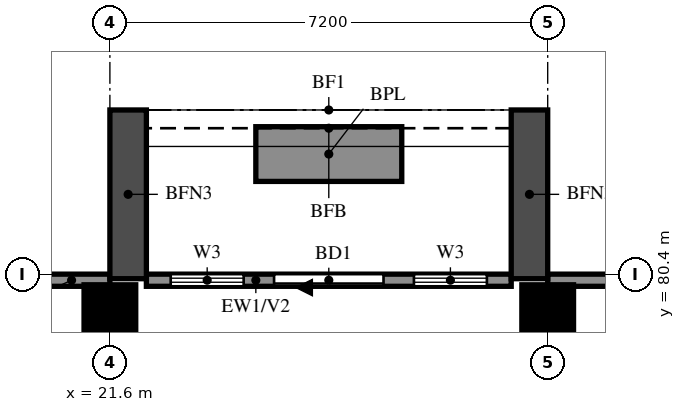
"""IFC4 building model, lengths in metres.
Left out: names, types, materials, properties, quantities, classifications, styles, units other than length and angle.
Written with IfcOpenShell. Run it as: python <this file> out.ifc"""

import sys

from ifc_helpers import new_model, si_unit, direction, frame, frame_2d, origin, origin_2d, place, context, subcontext, project, spatial, rectangle, extrude, source, transform, mapped, element, fill, save


model = new_model("IFC4")
c1 = context("Model", 3, precision=1e-05, world=origin(), true_north=direction((0.0, 1.0)))
c2 = subcontext(c1, "Body", "Model", "MODEL_VIEW")
j1 = project(units=[si_unit("LENGTHUNIT", "METRE"), si_unit("PLANEANGLEUNIT", "RADIAN")], contexts=[c1])
p1 = place(None, origin())
s1 = spatial("IfcSite", under=j1, at=p1, CompositionType="ELEMENT")
p2 = place(p1, origin())
s2 = spatial("IfcBuilding", under=s1, at=p2, CompositionType="ELEMENT")
p3 = place(p2, frame((0.0, 0.0, 150.0)))
s3 = spatial("IfcBuildingStorey", under=s2, at=p3, CompositionType="ELEMENT", Elevation=150.0)
m1 = source(origin(), c2, "Body", "SweptSolid", [
    extrude(rectangle(XDim=0.85, YDim=0.85, at=origin_2d()), origin(), (0.0, 0.0, 1.0), 3.2),
])
for number, where, z_axis, x_axis in (
    (1, (21.6, 79.8, 0.0), (0.0, 0.0, 1.0), (1.0, 0.0, 0.0)),
    (2, (28.8, 79.8, 0.0), (0.0, 0.0, 1.0), (1.0, 0.0, 0.0)),
):
    element("IfcColumn", number, at=place(p3, frame(where, z_axis=z_axis, x_axis=x_axis)), inside=s3, PredefinedType="COLUMN", context=c2, shape_type="MappedRepresentation", body=[
        mapped(m1, transform((0.0, 0.0, 0.0))),
    ])
p4 = place(p3, frame((82.6, 80.3, 0.0), z_axis=(0.0, 0.0, 1.0), x_axis=(-1.0, 0.0, 0.0)))
e3 = element("IfcWall", 3, at=p4, inside=s3, PredefinedType="SOLIDWALL", context=c2, shape_type="SweptSolid", body=[
    extrude(rectangle(XDim=53.8, YDim=0.2, at=frame_2d((26.9, 0.0))), origin(), (0.0, 0.0, 1.0), 3.2),
])
p5 = place(p4, frame((0.712, 0.0, 0.6)))
e4 = element("IfcOpeningElement", 4, at=p5, cuts=e3, PredefinedType="OPENING", context=c2, shape_type="SweptSolid", body=[
    extrude(rectangle(XDim=1.8, YDim=2.4, at=frame_2d((0.9, 1.2))), frame((0.0, 0.11, 0.0), z_axis=(0.0, -1.0, 0.0), x_axis=(1.0, 0.0, 0.0)), (0.0, 0.0, 1.0), 0.22),
])
p6 = place(p4, frame((4.358, 0.0, 0.6)))
e5 = element("IfcOpeningElement", 5, at=p6, cuts=e3, PredefinedType="OPENING", context=c2, shape_type="SweptSolid", body=[
    extrude(rectangle(XDim=2.4, YDim=2.4, at=frame_2d((1.2, 1.2))), frame((0.0, 0.11, 0.0), z_axis=(0.0, -1.0, 0.0), x_axis=(1.0, 0.0, 0.0)), (0.0, 0.0, 1.0), 0.22),
])
p7 = place(p4, frame((7.242, 0.0, 0.6)))
e6 = element("IfcOpeningElement", 6, at=p7, cuts=e3, PredefinedType="OPENING", context=c2, shape_type="SweptSolid", body=[
    extrude(rectangle(XDim=2.4, YDim=2.4, at=frame_2d((1.2, 1.2))), frame((0.0, 0.11, 0.0), z_axis=(0.0, -1.0, 0.0), x_axis=(1.0, 0.0, 0.0)), (0.0, 0.0, 1.0), 0.22),
])
p8 = place(p3, frame((28.2, 80.3, 0.0), z_axis=(0.0, 0.0, 1.0), x_axis=(-1.0, 0.0, 0.0)))
e7 = element("IfcWall", 7, at=p8, inside=s3, PredefinedType="SOLIDWALL", context=c2, shape_type="SweptSolid", body=[
    extrude(rectangle(XDim=6.0, YDim=0.2, at=frame_2d((3.0, 0.0))), origin(), (0.0, 0.0, 1.0), 3.2),
])
p9 = place(p8, frame((2.1, 0.0, 0.0)))
e8 = element("IfcOpeningElement", 8, at=p9, cuts=e7, PredefinedType="OPENING", context=c2, shape_type="SweptSolid", body=[
    extrude(rectangle(XDim=1.8, YDim=2.4, at=frame_2d((0.9, 1.2))), frame((0.0, 0.11, 0.0), z_axis=(0.0, -1.0, 0.0), x_axis=(1.0, 0.0, 0.0)), (0.0, 0.0, 1.0), 0.22),
])
p10 = place(p8, frame((0.4, 0.0, 0.6)))
e9 = element("IfcOpeningElement", 9, at=p10, cuts=e7, PredefinedType="OPENING", context=c2, shape_type="SweptSolid", body=[
    extrude(rectangle(XDim=1.2, YDim=2.4, at=frame_2d((0.6, 1.2))), frame((0.0, 0.11, 0.0), z_axis=(0.0, -1.0, 0.0), x_axis=(1.0, 0.0, 0.0)), (0.0, 0.0, 1.0), 0.22),
])
p11 = place(p8, frame((4.4, 0.0, 0.6)))
e10 = element("IfcOpeningElement", 10, at=p11, cuts=e7, PredefinedType="OPENING", context=c2, shape_type="SweptSolid", body=[
    extrude(rectangle(XDim=1.2, YDim=2.4, at=frame_2d((0.6, 1.2))), frame((0.0, 0.11, 0.0), z_axis=(0.0, -1.0, 0.0), x_axis=(1.0, 0.0, 0.0)), (0.0, 0.0, 1.0), 0.22),
])
p12 = place(p3, frame((21.6, 80.3, 0.0), z_axis=(0.0, 0.0, 1.0), x_axis=(-1.0, 0.0, 0.0)))
e11 = element("IfcWall", 11, at=p12, inside=s3, PredefinedType="SOLIDWALL", context=c2, shape_type="SweptSolid", body=[
    extrude(rectangle(XDim=3.6, YDim=0.2, at=frame_2d((1.8, 0.0))), origin(), (0.0, 0.0, 1.0), 3.2),
])
p13 = place(p12, frame((0.988, 0.0, 0.6)))
e12 = element("IfcOpeningElement", 12, at=p13, cuts=e11, PredefinedType="OPENING", context=c2, shape_type="SweptSolid", body=[
    extrude(rectangle(XDim=1.8, YDim=2.4, at=frame_2d((0.9, 1.2))), frame((0.0, 0.11, 0.0), z_axis=(0.0, -1.0, 0.0), x_axis=(1.0, 0.0, 0.0)), (0.0, 0.0, 1.0), 0.22),
])
for number, where, z_axis, x_axis in (
    (13, (28.5, 80.325, 0.0), (0.0, 0.0, 1.0), (0.0, 1.0, 0.0)),
    (14, (21.9, 80.325, 0.0), (0.0, 0.0, 1.0), (0.0, 1.0, 0.0)),
):
    element("IfcWall", number, at=place(p3, frame(where, z_axis=z_axis, x_axis=x_axis)), inside=s3, PredefinedType="SOLIDWALL", context=c2, shape_type="SweptSolid", body=[
        extrude(rectangle(XDim=2.775, YDim=0.6, at=frame_2d((1.388, 0.0))), origin(), (0.0, 0.0, 1.0), 2.85),
    ])
p14 = place(p3, frame((26.4, 82.375, 0.0), z_axis=(0.0, 0.0, 1.0), x_axis=(-1.0, 0.0, 0.0)))
e15 = element("IfcWall", 15, at=p14, inside=s3, PredefinedType="SOLIDWALL", context=c2, shape_type="SweptSolid", body=[
    extrude(rectangle(XDim=2.4, YDim=0.9, at=frame_2d((1.2, 0.0))), origin(), (0.0, 0.0, 1.0), 0.9),
])
p15 = place(p9, origin())
e16 = element("IfcDoor", 16, at=p15, inside=s3, OperationType="DOUBLE_DOOR_SLIDING", PredefinedType="DOOR", context=c2, shape_type="SweptSolid", body=[
    extrude(rectangle(XDim=1.8, YDim=2.4, at=frame_2d((0.9, 1.2))), frame((0.0, 0.025, 0.0), z_axis=(0.0, -1.0, 0.0), x_axis=(1.0, 0.0, 0.0)), (0.0, 0.0, 1.0), 0.05),
])
fill(e8, e16)
p16 = place(p10, origin())
e17 = element("IfcWindow", 17, at=p16, inside=s3, PartitioningType="SINGLE_PANEL", PredefinedType="WINDOW", context=c2, shape_type="SweptSolid", body=[
    extrude(rectangle(XDim=1.2, YDim=2.4, at=frame_2d((0.6, 1.2))), frame((0.0, 0.03, 0.0), z_axis=(0.0, -1.0, 0.0), x_axis=(1.0, 0.0, 0.0)), (0.0, 0.0, 1.0), 0.06),
])
fill(e9, e17)
p17 = place(p11, origin())
e18 = element("IfcWindow", 18, at=p17, inside=s3, PartitioningType="SINGLE_PANEL", PredefinedType="WINDOW", context=c2, shape_type="SweptSolid", body=[
    extrude(rectangle(XDim=1.2, YDim=2.4, at=frame_2d((0.6, 1.2))), frame((0.0, 0.03, 0.0), z_axis=(0.0, -1.0, 0.0), x_axis=(1.0, 0.0, 0.0)), (0.0, 0.0, 1.0), 0.06),
])
fill(e10, e18)
save(model, sys.argv[1])
